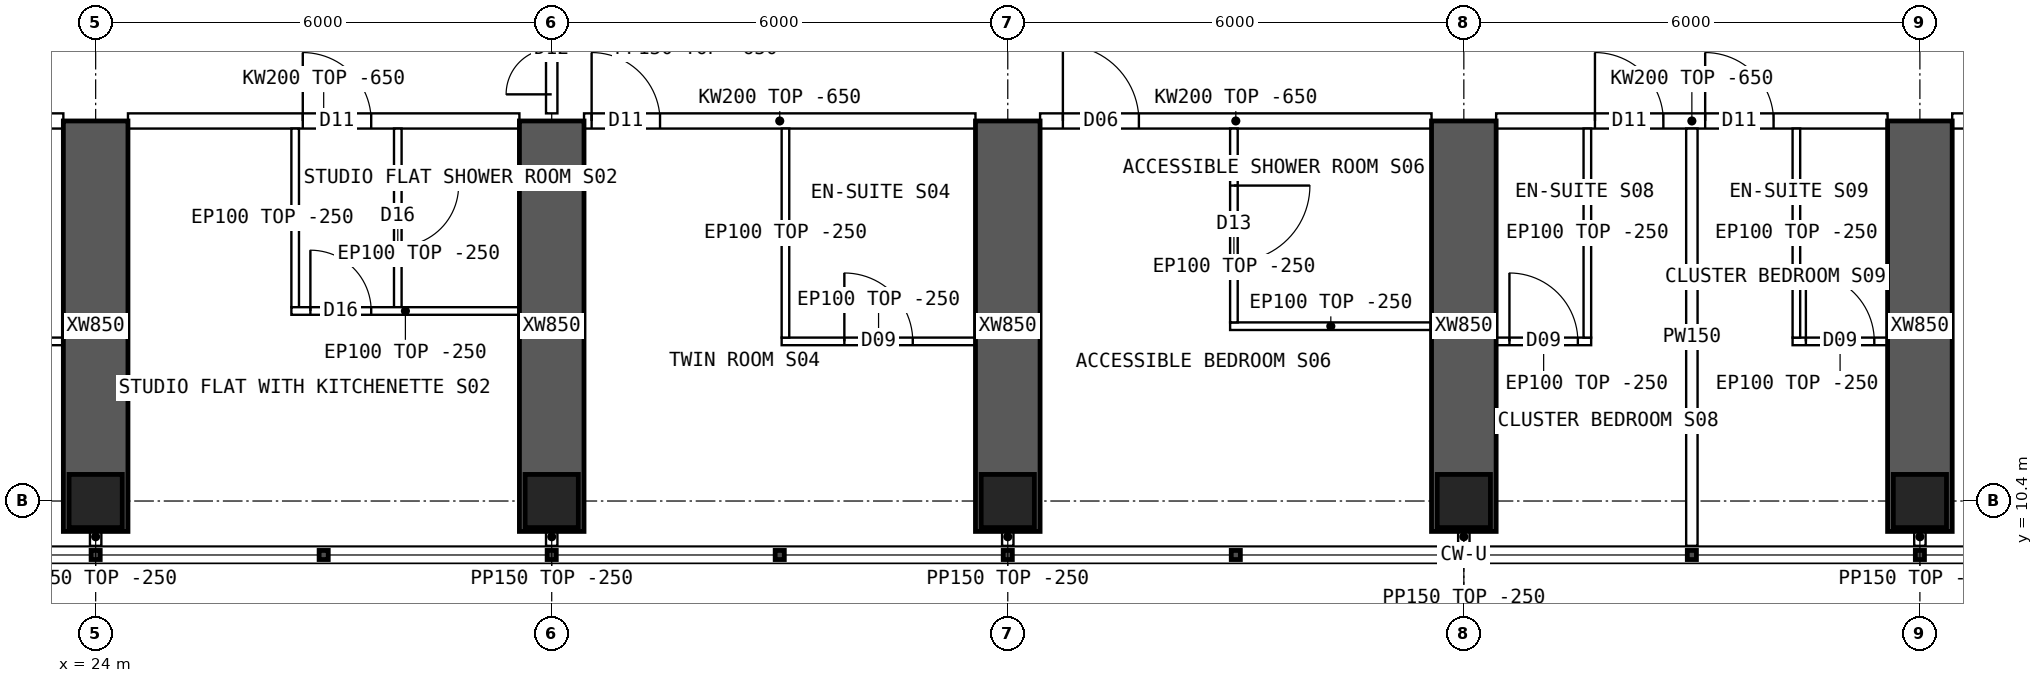
"""IFC4 building model, lengths in metres.
Left out: names, types, materials, properties, quantities, classifications, styles, units other than length and angle.
Written with IfcOpenShell. Run it as: python <this file> out.ifc"""

import sys

from ifc_helpers import new_model, si_unit, direction, frame, frame_2d, origin, origin_2d, place, context, subcontext, project, spatial, polyline, rectangle, hollow_rectangle, outline, extrude, element, fill, save


model = new_model("IFC4")
c1 = context("Model", 3, precision=1e-05, world=origin(), true_north=direction((0.0, 1.0)))
c2 = subcontext(c1, "Body", "Model", "MODEL_VIEW")
j1 = project(units=[si_unit("LENGTHUNIT", "METRE"), si_unit("PLANEANGLEUNIT", "RADIAN")], contexts=[c1])
p1 = place(None, origin())
s1 = spatial("IfcSite", under=j1, at=p1, CompositionType="ELEMENT")
p2 = place(p1, origin())
s2 = spatial("IfcBuilding", under=s1, at=p2, CompositionType="ELEMENT")
p3 = place(p2, frame((0.0, 0.0, 171.1)))
s3 = spatial("IfcBuildingStorey", under=s2, at=p3, CompositionType="ELEMENT", Elevation=171.1)
for number, where, z_axis, x_axis in (
    (1, (24.0, 10.4, 0.0), (0.0, 0.0, 1.0), (1.0, 0.0, 0.0)),
    (2, (30.0, 10.4, 0.0), (0.0, 0.0, 1.0), (1.0, 0.0, 0.0)),
    (3, (36.0, 10.4, 0.0), (0.0, 0.0, 1.0), (1.0, 0.0, 0.0)),
    (4, (42.0, 10.4, 0.0), (0.0, 0.0, 1.0), (1.0, 0.0, 0.0)),
    (5, (48.0, 10.4, 0.0), (0.0, 0.0, 1.0), (1.0, 0.0, 0.0)),
):
    element("IfcColumn", number, at=place(p3, frame(where, z_axis=z_axis, x_axis=x_axis)), inside=s3, PredefinedType="COLUMN", context=c2, shape_type="SweptSolid", body=[
        extrude(hollow_rectangle(XDim=0.7, YDim=0.7, WallThickness=0.07, at=origin_2d()), origin(), (0.0, 0.0, 1.0), 3.75),
    ])
for number, where, z_axis, x_axis in (
    (6, (24.0, 10.0, 0.0), (0.0, 0.0, 1.0), (0.0, 1.0, 0.0)),
    (7, (30.0, 10.0, 0.0), (0.0, 0.0, 1.0), (0.0, 1.0, 0.0)),
    (8, (36.0, 10.0, 0.0), (0.0, 0.0, 1.0), (0.0, 1.0, 0.0)),
    (9, (42.0, 10.0, 0.0), (0.0, 0.0, 1.0), (0.0, 1.0, 0.0)),
    (10, (48.0, 10.0, 0.0), (0.0, 0.0, 1.0), (0.0, 1.0, 0.0)),
):
    element("IfcWall", number, at=place(p3, frame(where, z_axis=z_axis, x_axis=x_axis)), inside=s3, PredefinedType="SHEAR", context=c2, shape_type="SweptSolid", body=[
        extrude(rectangle(XDim=5.4, YDim=0.85, at=frame_2d((2.7, 0.0))), origin(), (0.0, 0.0, 1.0), 3.75),
    ])
p4 = place(p3, frame((18.425, 15.4, 0.0), z_axis=(0.0, 0.0, 1.0), x_axis=(1.0, 0.0, 0.0)))
e11 = element("IfcWall", 11, at=p4, inside=s3, PredefinedType="SOLIDWALL", context=c2, shape_type="SweptSolid", body=[
    extrude(outline(polyline([(0.0, 0.0), (5.15, 0.0), (5.15, 3.1), (0.0, 3.1), (0.0, 0.0)])), frame((0.0, 0.1, 0.0), z_axis=(0.0, -1.0, 0.0), x_axis=(1.0, 0.0, 0.0)), (0.0, 0.0, 1.0), 0.2),
])
p5 = place(p4, frame((0.1, 0.0, 0.0)))
e12 = element("IfcOpeningElement", 12, at=p5, cuts=e11, PredefinedType="OPENING", context=c2, shape_type="SweptSolid", body=[
    extrude(rectangle(XDim=0.9, YDim=2.1, at=frame_2d((0.45, 1.05))), frame((0.0, 0.11, 0.0), z_axis=(0.0, -1.0, 0.0), x_axis=(1.0, 0.0, 0.0)), (0.0, 0.0, 1.0), 0.22),
])
p6 = place(p3, frame((24.425, 15.4, 0.0), z_axis=(0.0, 0.0, 1.0), x_axis=(1.0, 0.0, 0.0)))
e13 = element("IfcWall", 13, at=p6, inside=s3, PredefinedType="SOLIDWALL", context=c2, shape_type="SweptSolid", body=[
    extrude(outline(polyline([(0.0, 0.0), (5.15, 0.0), (5.15, 3.1), (0.0, 3.1), (0.0, 0.0)])), frame((0.0, 0.1, 0.0), z_axis=(0.0, -1.0, 0.0), x_axis=(1.0, 0.0, 0.0)), (0.0, 0.0, 1.0), 0.2),
])
p7 = place(p6, frame((2.3, 0.0, 0.0)))
e14 = element("IfcOpeningElement", 14, at=p7, cuts=e13, PredefinedType="OPENING", context=c2, shape_type="SweptSolid", body=[
    extrude(rectangle(XDim=0.9, YDim=2.1, at=frame_2d((0.45, 1.05))), frame((0.0, 0.11, 0.0), z_axis=(0.0, -1.0, 0.0), x_axis=(1.0, 0.0, 0.0)), (0.0, 0.0, 1.0), 0.22),
])
p8 = place(p3, frame((30.425, 15.4, 0.0), z_axis=(0.0, 0.0, 1.0), x_axis=(1.0, 0.0, 0.0)))
e15 = element("IfcWall", 15, at=p8, inside=s3, PredefinedType="SOLIDWALL", context=c2, shape_type="SweptSolid", body=[
    extrude(outline(polyline([(0.0, 0.0), (5.15, 0.0), (5.15, 3.1), (0.0, 3.1), (0.0, 0.0)])), frame((0.0, 0.1, 0.0), z_axis=(0.0, -1.0, 0.0), x_axis=(1.0, 0.0, 0.0)), (0.0, 0.0, 1.0), 0.2),
])
p9 = place(p8, frame((0.1, 0.0, 0.0)))
e16 = element("IfcOpeningElement", 16, at=p9, cuts=e15, PredefinedType="OPENING", context=c2, shape_type="SweptSolid", body=[
    extrude(rectangle(XDim=0.9, YDim=2.1, at=frame_2d((0.45, 1.05))), frame((0.0, 0.11, 0.0), z_axis=(0.0, -1.0, 0.0), x_axis=(1.0, 0.0, 0.0)), (0.0, 0.0, 1.0), 0.22),
])
p10 = place(p3, frame((36.425, 15.4, 0.0), z_axis=(0.0, 0.0, 1.0), x_axis=(1.0, 0.0, 0.0)))
e17 = element("IfcWall", 17, at=p10, inside=s3, PredefinedType="SOLIDWALL", context=c2, shape_type="SweptSolid", body=[
    extrude(outline(polyline([(0.0, 0.0), (5.15, 0.0), (5.15, 3.1), (0.0, 3.1), (0.0, 0.0)])), frame((0.0, 0.1, 0.0), z_axis=(0.0, -1.0, 0.0), x_axis=(1.0, 0.0, 0.0)), (0.0, 0.0, 1.0), 0.2),
])
p11 = place(p10, frame((0.3, 0.0, 0.0)))
e18 = element("IfcOpeningElement", 18, at=p11, cuts=e17, PredefinedType="OPENING", context=c2, shape_type="SweptSolid", body=[
    extrude(rectangle(XDim=1.0, YDim=2.1, at=frame_2d((0.5, 1.05))), frame((0.0, 0.11, 0.0), z_axis=(0.0, -1.0, 0.0), x_axis=(1.0, 0.0, 0.0)), (0.0, 0.0, 1.0), 0.22),
])
p12 = place(p3, frame((42.425, 15.4, 0.0), z_axis=(0.0, 0.0, 1.0), x_axis=(1.0, 0.0, 0.0)))
e19 = element("IfcWall", 19, at=p12, inside=s3, PredefinedType="SOLIDWALL", context=c2, shape_type="SweptSolid", body=[
    extrude(outline(polyline([(0.0, 0.0), (5.15, 0.0), (5.15, 3.1), (0.0, 3.1), (0.0, 0.0)])), frame((0.0, 0.1, 0.0), z_axis=(0.0, -1.0, 0.0), x_axis=(1.0, 0.0, 0.0)), (0.0, 0.0, 1.0), 0.2),
])
p13 = place(p12, frame((1.3, 0.0, 0.0)))
e20 = element("IfcOpeningElement", 20, at=p13, cuts=e19, PredefinedType="OPENING", context=c2, shape_type="SweptSolid", body=[
    extrude(rectangle(XDim=0.9, YDim=2.1, at=frame_2d((0.45, 1.05))), frame((0.0, 0.11, 0.0), z_axis=(0.0, -1.0, 0.0), x_axis=(1.0, 0.0, 0.0)), (0.0, 0.0, 1.0), 0.22),
])
p14 = place(p12, frame((2.75, 0.0, 0.0)))
e21 = element("IfcOpeningElement", 21, at=p14, cuts=e19, PredefinedType="OPENING", context=c2, shape_type="SweptSolid", body=[
    extrude(rectangle(XDim=0.9, YDim=2.1, at=frame_2d((0.45, 1.05))), frame((0.0, 0.11, 0.0), z_axis=(0.0, -1.0, 0.0), x_axis=(1.0, 0.0, 0.0)), (0.0, 0.0, 1.0), 0.22),
])
p15 = place(p3, frame((48.425, 15.4, 0.0), z_axis=(0.0, 0.0, 1.0), x_axis=(1.0, 0.0, 0.0)))
e22 = element("IfcWall", 22, at=p15, inside=s3, PredefinedType="SOLIDWALL", context=c2, shape_type="SweptSolid", body=[
    extrude(outline(polyline([(0.0, 0.0), (5.15, 0.0), (5.15, 3.1), (0.0, 3.1), (0.0, 0.0)])), frame((0.0, 0.1, 0.0), z_axis=(0.0, -1.0, 0.0), x_axis=(1.0, 0.0, 0.0)), (0.0, 0.0, 1.0), 0.2),
])
p16 = place(p15, frame((0.6, 0.0, 0.0)))
e23 = element("IfcOpeningElement", 23, at=p16, cuts=e22, PredefinedType="OPENING", context=c2, shape_type="SweptSolid", body=[
    extrude(rectangle(XDim=1.0, YDim=2.1, at=frame_2d((0.5, 1.05))), frame((0.0, 0.11, 0.0), z_axis=(0.0, -1.0, 0.0), x_axis=(1.0, 0.0, 0.0)), (0.0, 0.0, 1.0), 0.22),
])
p17 = place(p3, frame((23.575, 12.5, 0.0), z_axis=(0.0, 0.0, 1.0), x_axis=(-1.0, 0.0, 0.0)))
e24 = element("IfcWall", 24, at=p17, inside=s3, PredefinedType="PARTITIONING", context=c2, shape_type="SweptSolid", body=[
    extrude(rectangle(XDim=2.55, YDim=0.1, at=frame_2d((1.275, 0.0))), origin(), (0.0, 0.0, 1.0), 3.5),
])
p18 = place(p17, frame((0.825, 0.0, 0.0)))
e25 = element("IfcOpeningElement", 25, at=p18, cuts=e24, PredefinedType="OPENING", context=c2, shape_type="SweptSolid", body=[
    extrude(rectangle(XDim=0.9, YDim=2.1, at=frame_2d((0.45, 1.05))), frame((0.0, 0.06, 0.0), z_axis=(0.0, -1.0, 0.0), x_axis=(1.0, 0.0, 0.0)), (0.0, 0.0, 1.0), 0.12),
])
p19 = place(p3, frame((29.575, 12.9, 0.0), z_axis=(0.0, 0.0, 1.0), x_axis=(-1.0, 0.0, 0.0)))
e26 = element("IfcWall", 26, at=p19, inside=s3, PredefinedType="PARTITIONING", context=c2, shape_type="SweptSolid", body=[
    extrude(rectangle(XDim=3.0, YDim=0.1, at=frame_2d((1.5, 0.0))), origin(), (0.0, 0.0, 1.0), 3.5),
])
p20 = place(p19, frame((1.95, 0.0, 0.0)))
e27 = element("IfcOpeningElement", 27, at=p20, cuts=e26, PredefinedType="OPENING", context=c2, shape_type="SweptSolid", body=[
    extrude(rectangle(XDim=0.8, YDim=2.1, at=frame_2d((0.4, 1.05))), frame((0.0, 0.06, 0.0), z_axis=(0.0, -1.0, 0.0), x_axis=(1.0, 0.0, 0.0)), (0.0, 0.0, 1.0), 0.12),
])
p21 = place(p3, frame((26.625, 12.95, 0.0), z_axis=(0.0, 0.0, 1.0), x_axis=(0.0, 1.0, 0.0)))
e28 = element("IfcWall", 28, at=p21, inside=s3, PredefinedType="PARTITIONING", context=c2, shape_type="SweptSolid", body=[
    extrude(outline(polyline([(0.0, 0.0), (2.35, 0.0), (2.35, 3.1), (2.302, 3.1), (2.3, 3.5), (0.0, 3.5), (0.0, 0.0)])), frame((0.0, 0.05, 0.0), z_axis=(0.0, -1.0, 0.0), x_axis=(1.0, 0.0, 0.0)), (0.0, 0.0, 1.0), 0.1),
])
p22 = place(p3, frame((27.975, 12.95, 0.0), z_axis=(0.0, 0.0, 1.0), x_axis=(0.0, 1.0, 0.0)))
e29 = element("IfcWall", 29, at=p22, inside=s3, PredefinedType="PARTITIONING", context=c2, shape_type="SweptSolid", body=[
    extrude(outline(polyline([(0.0, 0.0), (2.35, 0.0), (2.35, 3.1), (2.302, 3.1), (2.3, 3.5), (0.0, 3.5), (0.0, 0.0)])), frame((0.0, 0.05, 0.0), z_axis=(0.0, -1.0, 0.0), x_axis=(1.0, 0.0, 0.0)), (0.0, 0.0, 1.0), 0.1),
])
p23 = place(p22, frame((0.8, 0.0, 0.0)))
e30 = element("IfcOpeningElement", 30, at=p23, cuts=e29, PredefinedType="OPENING", context=c2, shape_type="SweptSolid", body=[
    extrude(rectangle(XDim=0.8, YDim=2.1, at=frame_2d((0.4, 1.05))), frame((0.0, 0.06, 0.0), z_axis=(0.0, -1.0, 0.0), x_axis=(1.0, 0.0, 0.0)), (0.0, 0.0, 1.0), 0.12),
])
p24 = place(p3, frame((35.575, 12.5, 0.0), z_axis=(0.0, 0.0, 1.0), x_axis=(-1.0, 0.0, 0.0)))
e31 = element("IfcWall", 31, at=p24, inside=s3, PredefinedType="PARTITIONING", context=c2, shape_type="SweptSolid", body=[
    extrude(rectangle(XDim=2.55, YDim=0.1, at=frame_2d((1.275, 0.0))), origin(), (0.0, 0.0, 1.0), 3.5),
])
p25 = place(p24, frame((0.825, 0.0, 0.0)))
e32 = element("IfcOpeningElement", 32, at=p25, cuts=e31, PredefinedType="OPENING", context=c2, shape_type="SweptSolid", body=[
    extrude(rectangle(XDim=0.9, YDim=2.1, at=frame_2d((0.45, 1.05))), frame((0.0, 0.06, 0.0), z_axis=(0.0, -1.0, 0.0), x_axis=(1.0, 0.0, 0.0)), (0.0, 0.0, 1.0), 0.12),
])
p26 = place(p3, frame((33.075, 12.55, 0.0), z_axis=(0.0, 0.0, 1.0), x_axis=(0.0, 1.0, 0.0)))
e33 = element("IfcWall", 33, at=p26, inside=s3, PredefinedType="PARTITIONING", context=c2, shape_type="SweptSolid", body=[
    extrude(outline(polyline([(0.0, 0.0), (2.75, 0.0), (2.75, 3.1), (2.702, 3.1), (2.7, 3.5), (0.0, 3.5), (0.0, 0.0)])), frame((0.0, 0.05, 0.0), z_axis=(0.0, -1.0, 0.0), x_axis=(1.0, 0.0, 0.0)), (0.0, 0.0, 1.0), 0.1),
])
p27 = place(p3, frame((38.925, 12.7, 0.0), z_axis=(0.0, 0.0, 1.0), x_axis=(1.0, 0.0, 0.0)))
e34 = element("IfcWall", 34, at=p27, inside=s3, PredefinedType="PARTITIONING", context=c2, shape_type="SweptSolid", body=[
    extrude(rectangle(XDim=2.65, YDim=0.1, at=frame_2d((1.325, 0.0))), origin(), (0.0, 0.0, 1.0), 3.5),
])
p28 = place(p3, frame((38.975, 12.75, 0.0), z_axis=(0.0, 0.0, 1.0), x_axis=(0.0, 1.0, 0.0)))
e35 = element("IfcWall", 35, at=p28, inside=s3, PredefinedType="PARTITIONING", context=c2, shape_type="SweptSolid", body=[
    extrude(outline(polyline([(0.0, 0.0), (2.55, 0.0), (2.55, 3.1), (2.502, 3.1), (2.5, 3.5), (0.0, 3.5), (0.0, 0.0)])), frame((0.0, 0.05, 0.0), z_axis=(0.0, -1.0, 0.0), x_axis=(1.0, 0.0, 0.0)), (0.0, 0.0, 1.0), 0.1),
])
p29 = place(p28, frame((0.8, 0.0, 0.0)))
e36 = element("IfcOpeningElement", 36, at=p29, cuts=e35, PredefinedType="OPENING", context=c2, shape_type="SweptSolid", body=[
    extrude(rectangle(XDim=1.0, YDim=2.1, at=frame_2d((0.5, 1.05))), frame((0.0, 0.06, 0.0), z_axis=(0.0, -1.0, 0.0), x_axis=(1.0, 0.0, 0.0)), (0.0, 0.0, 1.0), 0.12),
])
p30 = place(p3, frame((45.0, 9.81, 0.0), z_axis=(0.0, 0.0, 1.0), x_axis=(0.0, 1.0, 0.0)))
e37 = element("IfcWall", 37, at=p30, inside=s3, PredefinedType="PARTITIONING", context=c2, shape_type="SweptSolid", body=[
    extrude(outline(polyline([(0.0, 0.0), (5.49, 0.0), (5.49, 3.1), (5.442, 3.1), (5.44, 3.5), (0.792, 3.5), (0.79, 3.1), (0.392, 3.1), (0.39, 3.5), (0.0, 3.5), (0.0, 0.0)])), frame((0.0, 0.075, 0.0), z_axis=(0.0, -1.0, 0.0), x_axis=(1.0, 0.0, 0.0)), (0.0, 0.0, 1.0), 0.15),
])
p31 = place(p3, frame((43.675, 12.5, 0.0), z_axis=(0.0, 0.0, 1.0), x_axis=(-1.0, 0.0, 0.0)))
e38 = element("IfcWall", 38, at=p31, inside=s3, PredefinedType="PARTITIONING", context=c2, shape_type="SweptSolid", body=[
    extrude(rectangle(XDim=1.25, YDim=0.1, at=frame_2d((0.625, 0.0))), origin(), (0.0, 0.0, 1.0), 3.5),
])
p32 = place(p31, frame((0.175, 0.0, 0.0)))
e39 = element("IfcOpeningElement", 39, at=p32, cuts=e38, PredefinedType="OPENING", context=c2, shape_type="SweptSolid", body=[
    extrude(rectangle(XDim=0.9, YDim=2.1, at=frame_2d((0.45, 1.05))), frame((0.0, 0.06, 0.0), z_axis=(0.0, -1.0, 0.0), x_axis=(1.0, 0.0, 0.0)), (0.0, 0.0, 1.0), 0.12),
])
p33 = place(p3, frame((43.625, 12.55, 0.0), z_axis=(0.0, 0.0, 1.0), x_axis=(0.0, 1.0, 0.0)))
e40 = element("IfcWall", 40, at=p33, inside=s3, PredefinedType="PARTITIONING", context=c2, shape_type="SweptSolid", body=[
    extrude(outline(polyline([(0.0, 0.0), (2.75, 0.0), (2.75, 3.1), (2.702, 3.1), (2.7, 3.5), (0.0, 3.5), (0.0, 0.0)])), frame((0.0, 0.05, 0.0), z_axis=(0.0, -1.0, 0.0), x_axis=(1.0, 0.0, 0.0)), (0.0, 0.0, 1.0), 0.1),
])
p34 = place(p3, frame((47.575, 12.5, 0.0), z_axis=(0.0, 0.0, 1.0), x_axis=(-1.0, 0.0, 0.0)))
e41 = element("IfcWall", 41, at=p34, inside=s3, PredefinedType="PARTITIONING", context=c2, shape_type="SweptSolid", body=[
    extrude(rectangle(XDim=1.25, YDim=0.1, at=frame_2d((0.625, 0.0))), origin(), (0.0, 0.0, 1.0), 3.5),
])
p35 = place(p34, frame((0.175, 0.0, 0.0)))
e42 = element("IfcOpeningElement", 42, at=p35, cuts=e41, PredefinedType="OPENING", context=c2, shape_type="SweptSolid", body=[
    extrude(rectangle(XDim=0.9, YDim=2.1, at=frame_2d((0.45, 1.05))), frame((0.0, 0.06, 0.0), z_axis=(0.0, -1.0, 0.0), x_axis=(1.0, 0.0, 0.0)), (0.0, 0.0, 1.0), 0.12),
])
p36 = place(p3, frame((46.375, 12.55, 0.0), z_axis=(0.0, 0.0, 1.0), x_axis=(0.0, 1.0, 0.0)))
e43 = element("IfcWall", 43, at=p36, inside=s3, PredefinedType="PARTITIONING", context=c2, shape_type="SweptSolid", body=[
    extrude(outline(polyline([(0.0, 0.0), (2.75, 0.0), (2.75, 3.1), (2.702, 3.1), (2.7, 3.5), (0.0, 3.5), (0.0, 0.0)])), frame((0.0, 0.05, 0.0), z_axis=(0.0, -1.0, 0.0), x_axis=(1.0, 0.0, 0.0)), (0.0, 0.0, 1.0), 0.1),
])
p37 = place(p3, frame((30.0, 15.5, 0.0), z_axis=(0.0, 0.0, 1.0), x_axis=(0.0, 1.0, 0.0)))
e44 = element("IfcWall", 44, at=p37, inside=s3, PredefinedType="PARTITIONING", context=c2, shape_type="SweptSolid", body=[
    extrude(outline(polyline([(0.0, 0.0), (1.7, 0.0), (1.7, 3.1), (0.0, 3.1), (0.0, 0.0)])), frame((0.0, 0.075, 0.0), z_axis=(0.0, -1.0, 0.0), x_axis=(1.0, 0.0, 0.0)), (0.0, 0.0, 1.0), 0.15),
])
p38 = place(p37, frame((0.25, 0.0, 0.0)))
e45 = element("IfcOpeningElement", 45, at=p38, cuts=e44, PredefinedType="OPENING", context=c2, shape_type="SweptSolid", body=[
    extrude(rectangle(XDim=1.2, YDim=2.1, at=frame_2d((0.6, 1.05))), frame((0.0, 0.085, 0.0), z_axis=(0.0, -1.0, 0.0), x_axis=(1.0, 0.0, 0.0)), (0.0, 0.0, 1.0), 0.17),
])
for number, where, z_axis, x_axis in (
    (46, (24.0, 10.05, 0.0), (0.0, 0.0, 1.0), (0.0, -1.0, 0.0)),
    (47, (30.0, 10.05, 0.0), (0.0, 0.0, 1.0), (0.0, -1.0, 0.0)),
    (48, (36.0, 10.05, 0.0), (0.0, 0.0, 1.0), (0.0, -1.0, 0.0)),
    (49, (42.0, 10.05, 0.0), (0.0, 0.0, 1.0), (0.0, -1.0, 0.0)),
    (50, (48.0, 10.05, 0.0), (0.0, 0.0, 1.0), (0.0, -1.0, 0.0)),
):
    element("IfcWall", number, at=place(p3, frame(where, z_axis=z_axis, x_axis=x_axis)), inside=s3, PredefinedType="PARTITIONING", context=c2, shape_type="SweptSolid", body=[
        extrude(rectangle(XDim=0.24, YDim=0.15, at=frame_2d((0.12, 0.0))), origin(), (0.0, 0.0, 1.0), 3.5),
    ])
p39 = place(p20, origin())
e51 = element("IfcDoor", 51, at=p39, inside=s3, OperationType="SINGLE_SWING_RIGHT", PredefinedType="DOOR", context=c2, shape_type="SweptSolid", body=[
    extrude(rectangle(XDim=0.8, YDim=2.1, at=frame_2d((0.4, 1.05))), frame((0.0, 0.025, 0.0), z_axis=(0.0, -1.0, 0.0), x_axis=(1.0, 0.0, 0.0)), (0.0, 0.0, 1.0), 0.05),
])
fill(e27, e51)
p40 = place(p23, origin())
e52 = element("IfcDoor", 52, at=p40, inside=s3, OperationType="SINGLE_SWING_RIGHT", PredefinedType="DOOR", context=c2, shape_type="SweptSolid", body=[
    extrude(rectangle(XDim=0.8, YDim=2.1, at=frame_2d((0.4, 1.05))), frame((0.0, 0.025, 0.0), z_axis=(0.0, -1.0, 0.0), x_axis=(1.0, 0.0, 0.0)), (0.0, 0.0, 1.0), 0.05),
])
fill(e30, e52)
p41 = place(p7, origin())
e53 = element("IfcDoor", 53, at=p41, inside=s3, OperationType="SINGLE_SWING_LEFT", PredefinedType="DOOR", context=c2, shape_type="SweptSolid", body=[
    extrude(rectangle(XDim=0.9, YDim=2.1, at=frame_2d((0.45, 1.05))), frame((0.0, 0.025, 0.0), z_axis=(0.0, -1.0, 0.0), x_axis=(1.0, 0.0, 0.0)), (0.0, 0.0, 1.0), 0.05),
])
fill(e14, e53)
p42 = place(p25, origin())
e54 = element("IfcDoor", 54, at=p42, inside=s3, OperationType="SINGLE_SWING_RIGHT", PredefinedType="DOOR", context=c2, shape_type="SweptSolid", body=[
    extrude(rectangle(XDim=0.9, YDim=2.1, at=frame_2d((0.45, 1.05))), frame((0.0, 0.025, 0.0), z_axis=(0.0, -1.0, 0.0), x_axis=(1.0, 0.0, 0.0)), (0.0, 0.0, 1.0), 0.05),
])
fill(e32, e54)
p43 = place(p9, origin())
e55 = element("IfcDoor", 55, at=p43, inside=s3, OperationType="SINGLE_SWING_LEFT", PredefinedType="DOOR", context=c2, shape_type="SweptSolid", body=[
    extrude(rectangle(XDim=0.9, YDim=2.1, at=frame_2d((0.45, 1.05))), frame((0.0, 0.025, 0.0), z_axis=(0.0, -1.0, 0.0), x_axis=(1.0, 0.0, 0.0)), (0.0, 0.0, 1.0), 0.05),
])
fill(e16, e55)
p44 = place(p29, origin())
e56 = element("IfcDoor", 56, at=p44, inside=s3, OperationType="SINGLE_SWING_RIGHT", PredefinedType="DOOR", context=c2, shape_type="SweptSolid", body=[
    extrude(rectangle(XDim=1.0, YDim=2.1, at=frame_2d((0.5, 1.05))), frame((0.0, 0.025, 0.0), z_axis=(0.0, -1.0, 0.0), x_axis=(1.0, 0.0, 0.0)), (0.0, 0.0, 1.0), 0.05),
])
fill(e36, e56)
p45 = place(p11, origin())
e57 = element("IfcDoor", 57, at=p45, inside=s3, OperationType="SINGLE_SWING_LEFT", PredefinedType="DOOR", context=c2, shape_type="SweptSolid", body=[
    extrude(rectangle(XDim=1.0, YDim=2.1, at=frame_2d((0.5, 1.05))), frame((0.0, 0.025, 0.0), z_axis=(0.0, -1.0, 0.0), x_axis=(1.0, 0.0, 0.0)), (0.0, 0.0, 1.0), 0.05),
])
fill(e18, e57)
p46 = place(p32, origin())
e58 = element("IfcDoor", 58, at=p46, inside=s3, OperationType="SINGLE_SWING_RIGHT", PredefinedType="DOOR", context=c2, shape_type="SweptSolid", body=[
    extrude(rectangle(XDim=0.9, YDim=2.1, at=frame_2d((0.45, 1.05))), frame((0.0, 0.025, 0.0), z_axis=(0.0, -1.0, 0.0), x_axis=(1.0, 0.0, 0.0)), (0.0, 0.0, 1.0), 0.05),
])
fill(e39, e58)
p47 = place(p13, origin())
e59 = element("IfcDoor", 59, at=p47, inside=s3, OperationType="SINGLE_SWING_LEFT", PredefinedType="DOOR", context=c2, shape_type="SweptSolid", body=[
    extrude(rectangle(XDim=0.9, YDim=2.1, at=frame_2d((0.45, 1.05))), frame((0.0, 0.025, 0.0), z_axis=(0.0, -1.0, 0.0), x_axis=(1.0, 0.0, 0.0)), (0.0, 0.0, 1.0), 0.05),
])
fill(e20, e59)
p48 = place(p35, origin())
e60 = element("IfcDoor", 60, at=p48, inside=s3, OperationType="SINGLE_SWING_RIGHT", PredefinedType="DOOR", context=c2, shape_type="SweptSolid", body=[
    extrude(rectangle(XDim=0.9, YDim=2.1, at=frame_2d((0.45, 1.05))), frame((0.0, 0.025, 0.0), z_axis=(0.0, -1.0, 0.0), x_axis=(1.0, 0.0, 0.0)), (0.0, 0.0, 1.0), 0.05),
])
fill(e42, e60)
p49 = place(p14, origin())
e61 = element("IfcDoor", 61, at=p49, inside=s3, OperationType="SINGLE_SWING_LEFT", PredefinedType="DOOR", context=c2, shape_type="SweptSolid", body=[
    extrude(rectangle(XDim=0.9, YDim=2.1, at=frame_2d((0.45, 1.05))), frame((0.0, 0.025, 0.0), z_axis=(0.0, -1.0, 0.0), x_axis=(1.0, 0.0, 0.0)), (0.0, 0.0, 1.0), 0.05),
])
fill(e21, e61)
p50 = place(p38, origin())
e62 = element("IfcDoor", 62, at=p50, inside=s3, OperationType="DOUBLE_DOOR_SINGLE_SWING", PredefinedType="DOOR", context=c2, shape_type="SweptSolid", body=[
    extrude(rectangle(XDim=1.2, YDim=2.1, at=frame_2d((0.6, 1.05))), frame((0.0, 0.025, 0.0), z_axis=(0.0, -1.0, 0.0), x_axis=(1.0, 0.0, 0.0)), (0.0, 0.0, 1.0), 0.05),
])
fill(e45, e62)
save(model, sys.argv[1])
